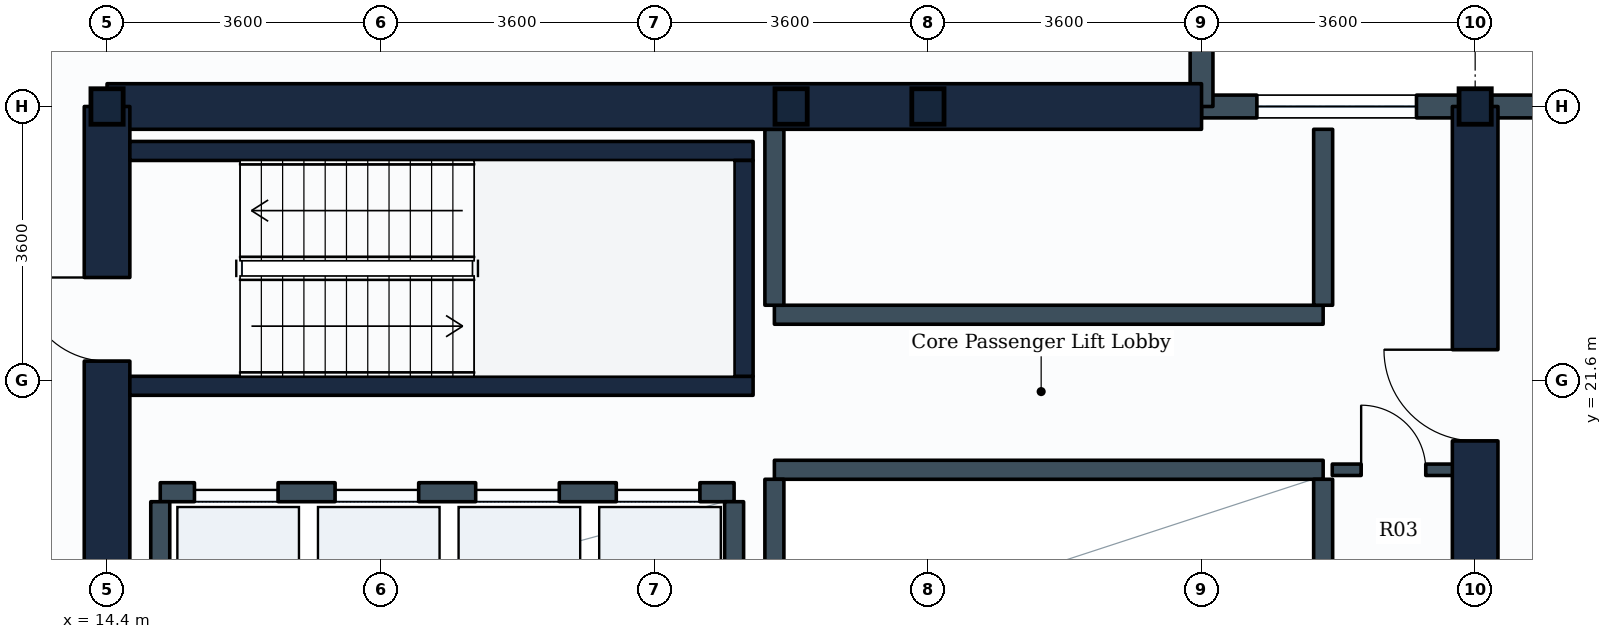
"""IFC4 building model, lengths in metres.
Left out: names, types, materials, properties, quantities, classifications, styles, units other than length and angle.
Written with IfcOpenShell. Run it as: python <this file> out.ifc"""

import sys

from ifc_helpers import new_model, si_unit, direction, frame, frame_2d, origin, origin_2d, place, context, subcontext, project, spatial, rectangle, i_section, extrude, element, fill, save


model = new_model("IFC4")
c1 = context("Model", 3, precision=1e-05, world=origin(), true_north=direction((0.0, 1.0)))
c2 = subcontext(c1, "Body", "Model", "MODEL_VIEW")
j1 = project(units=[si_unit("LENGTHUNIT", "METRE"), si_unit("PLANEANGLEUNIT", "RADIAN")], contexts=[c1])
p1 = place(None, origin())
s1 = spatial("IfcSite", under=j1, at=p1, CompositionType="ELEMENT")
p2 = place(p1, origin())
s2 = spatial("IfcBuilding", under=s1, at=p2, CompositionType="ELEMENT")
p3 = place(p2, frame((0.0, 0.0, 27.9)))
s3 = spatial("IfcBuildingStorey", under=s2, at=p3, CompositionType="ELEMENT", Elevation=27.9)
for number, where, z_axis, x_axis in (
    (1, (14.4, 25.2, 0.0), (0.0, 0.0, 1.0), (1.0, 0.0, 0.0)),
    (2, (23.4, 25.2, 0.0), (0.0, 0.0, 1.0), (1.0, 0.0, 0.0)),
    (3, (25.2, 25.2, 0.0), (0.0, 0.0, 1.0), (1.0, 0.0, 0.0)),
    (4, (32.4, 25.2, 0.0), (0.0, 0.0, 1.0), (1.0, 0.0, 0.0)),
):
    element("IfcColumn", number, at=place(p3, frame(where, z_axis=z_axis, x_axis=x_axis)), inside=s3, PredefinedType="COLUMN", context=c2, shape_type="SweptSolid", body=[
        extrude(i_section(OverallWidth=0.424, OverallDepth=0.467, WebThickness=0.033, FlangeThickness=0.053, FilletRadius=0.015, at=origin_2d()), origin(), (0.0, 0.0, 1.0), 3.9),
    ])
p4 = place(p3, frame((32.4, 25.2, 0.0), z_axis=(0.0, 0.0, 1.0), x_axis=(1.0, 0.0, 0.0)))
e5 = element("IfcWall", 5, at=p4, inside=s3, PredefinedType="STANDARD", context=c2, shape_type="SweptSolid", body=[
    extrude(rectangle(XDim=3.6, YDim=0.3, at=frame_2d((1.8, 0.0))), origin(), (0.0, 0.0, 1.0), 2.93),
])
p5 = place(p3, frame((28.8, 25.2, 0.0), z_axis=(0.0, 0.0, 1.0), x_axis=(1.0, 0.0, 0.0)))
e6 = element("IfcWall", 6, at=p5, inside=s3, PredefinedType="STANDARD", context=c2, shape_type="SweptSolid", body=[
    extrude(rectangle(XDim=3.6, YDim=0.3, at=frame_2d((1.8, 0.0))), origin(), (0.0, 0.0, 1.0), 3.635),
])
p6 = place(p5, frame((0.728, 0.0, 0.85)))
e7 = element("IfcOpeningElement", 7, at=p6, cuts=e6, PredefinedType="OPENING", context=c2, shape_type="SweptSolid", body=[
    extrude(rectangle(XDim=2.1, YDim=1.35, at=frame_2d((1.05, 0.675))), frame((0.0, 0.16, 0.0), z_axis=(0.0, -1.0, 0.0), x_axis=(1.0, 0.0, 0.0)), (0.0, 0.0, 1.0), 0.32),
])
p7 = place(p3, frame((28.8, 25.2, 0.0), z_axis=(0.0, 0.0, 1.0), x_axis=(0.0, 1.0, 0.0)))
e8 = element("IfcWall", 8, at=p7, inside=s3, PredefinedType="STANDARD", context=c2, shape_type="SweptSolid", body=[
    extrude(rectangle(XDim=3.6, YDim=0.3, at=frame_2d((1.8, 0.0))), origin(), (0.0, 0.0, 1.0), 3.14),
])
p8 = place(p3, frame((14.4, 25.2, 0.0), z_axis=(0.0, 0.0, 1.0), x_axis=(1.0, 0.0, 0.0)))
e9 = element("IfcWall", 9, at=p8, inside=s3, PredefinedType="SHEAR", context=c2, shape_type="SweptSolid", body=[
    extrude(rectangle(XDim=14.4, YDim=0.6, at=frame_2d((7.2, 0.0))), origin(), (0.0, 0.0, 1.0), 3.65),
])
p9 = place(p3, frame((14.4, 10.8, 0.0), z_axis=(0.0, 0.0, 1.0), x_axis=(0.0, 1.0, 0.0)))
e10 = element("IfcWall", 10, at=p9, inside=s3, PredefinedType="SHEAR", context=c2, shape_type="SweptSolid", body=[
    extrude(rectangle(XDim=14.4, YDim=0.6, at=frame_2d((7.2, 0.0))), origin(), (0.0, 0.0, 1.0), 3.65),
])
p10 = place(p9, frame((11.05, 0.0, 0.0)))
e11 = element("IfcOpeningElement", 11, at=p10, cuts=e10, PredefinedType="OPENING", context=c2, shape_type="SweptSolid", body=[
    extrude(rectangle(XDim=1.1, YDim=2.1, at=frame_2d((0.55, 1.05))), frame((0.0, 0.31, 0.0), z_axis=(0.0, -1.0, 0.0), x_axis=(1.0, 0.0, 0.0)), (0.0, 0.0, 1.0), 0.62),
])
p11 = place(p9, frame((4.9, 0.0, 0.0)))
e12 = element("IfcOpeningElement", 12, at=p11, cuts=e10, PredefinedType="OPENING", context=c2, shape_type="SweptSolid", body=[
    extrude(rectangle(XDim=1.2, YDim=2.1, at=frame_2d((0.6, 1.05))), frame((0.0, 0.31, 0.0), z_axis=(0.0, -1.0, 0.0), x_axis=(1.0, 0.0, 0.0)), (0.0, 0.0, 1.0), 0.62),
])
p12 = place(p3, frame((32.4, 10.8, 0.0), z_axis=(0.0, 0.0, 1.0), x_axis=(0.0, 1.0, 0.0)))
e13 = element("IfcWall", 13, at=p12, inside=s3, PredefinedType="SHEAR", context=c2, shape_type="SweptSolid", body=[
    extrude(rectangle(XDim=14.4, YDim=0.6, at=frame_2d((7.2, 0.0))), origin(), (0.0, 0.0, 1.0), 3.65),
])
p13 = place(p12, frame((4.35, 0.0, 0.0)))
e14 = element("IfcOpeningElement", 14, at=p13, cuts=e13, PredefinedType="OPENING", context=c2, shape_type="SweptSolid", body=[
    extrude(rectangle(XDim=1.2, YDim=2.1, at=frame_2d((0.6, 1.05))), frame((0.0, 0.31, 0.0), z_axis=(0.0, -1.0, 0.0), x_axis=(1.0, 0.0, 0.0)), (0.0, 0.0, 1.0), 0.62),
])
p14 = place(p12, frame((10.0, 0.0, 0.0)))
e15 = element("IfcOpeningElement", 15, at=p14, cuts=e13, PredefinedType="OPENING", context=c2, shape_type="SweptSolid", body=[
    extrude(rectangle(XDim=1.2, YDim=2.1, at=frame_2d((0.6, 1.05))), frame((0.0, 0.31, 0.0), z_axis=(0.0, -1.0, 0.0), x_axis=(1.0, 0.0, 0.0)), (0.0, 0.0, 1.0), 0.62),
])
for number, where, z_axis, x_axis in (
    (16, (14.7, 21.525, 0.0), (0.0, 0.0, 1.0), (1.0, 0.0, 0.0)),
    (17, (14.7, 24.615, 0.0), (0.0, 0.0, 1.0), (1.0, 0.0, 0.0)),
):
    element("IfcWall", number, at=place(p3, frame(where, z_axis=z_axis, x_axis=x_axis)), inside=s3, PredefinedType="SHEAR", context=c2, shape_type="SweptSolid", body=[
        extrude(rectangle(XDim=8.2, YDim=0.25, at=frame_2d((4.1, 0.0))), origin(), (0.0, 0.0, 1.0), 3.65),
    ])
p15 = place(p3, frame((22.775, 21.65, 0.0), z_axis=(0.0, 0.0, 1.0), x_axis=(0.0, 1.0, 0.0)))
e18 = element("IfcWall", 18, at=p15, inside=s3, PredefinedType="SHEAR", context=c2, shape_type="SweptSolid", body=[
    extrude(rectangle(XDim=2.84, YDim=0.25, at=frame_2d((1.42, 0.0))), origin(), (0.0, 0.0, 1.0), 3.65),
])
p16 = place(p3, frame((15.1, 20.125, 0.0), z_axis=(0.0, 0.0, 1.0), x_axis=(1.0, 0.0, 0.0)))
e19 = element("IfcWall", 19, at=p16, inside=s3, PredefinedType="PARTITIONING", context=c2, shape_type="SweptSolid", body=[
    extrude(rectangle(XDim=7.55, YDim=0.25, at=frame_2d((3.775, 0.0))), origin(), (0.0, 0.0, 1.0), 3.635),
])
p17 = place(p16, frame((0.45, 0.0, 0.0)))
e20 = element("IfcOpeningElement", 20, at=p17, cuts=e19, PredefinedType="OPENING", context=c2, shape_type="SweptSolid", body=[
    extrude(rectangle(XDim=1.1, YDim=2.1, at=frame_2d((0.55, 1.05))), frame((0.0, 0.135, 0.0), z_axis=(0.0, -1.0, 0.0), x_axis=(1.0, 0.0, 0.0)), (0.0, 0.0, 1.0), 0.27),
])
p18 = place(p16, frame((2.3, 0.0, 0.0)))
e21 = element("IfcOpeningElement", 21, at=p18, cuts=e19, PredefinedType="OPENING", context=c2, shape_type="SweptSolid", body=[
    extrude(rectangle(XDim=1.1, YDim=2.1, at=frame_2d((0.55, 1.05))), frame((0.0, 0.135, 0.0), z_axis=(0.0, -1.0, 0.0), x_axis=(1.0, 0.0, 0.0)), (0.0, 0.0, 1.0), 0.27),
])
p19 = place(p16, frame((4.15, 0.0, 0.0)))
e22 = element("IfcOpeningElement", 22, at=p19, cuts=e19, PredefinedType="OPENING", context=c2, shape_type="SweptSolid", body=[
    extrude(rectangle(XDim=1.1, YDim=2.1, at=frame_2d((0.55, 1.05))), frame((0.0, 0.135, 0.0), z_axis=(0.0, -1.0, 0.0), x_axis=(1.0, 0.0, 0.0)), (0.0, 0.0, 1.0), 0.27),
])
p20 = place(p16, frame((6.0, 0.0, 0.0)))
e23 = element("IfcOpeningElement", 23, at=p20, cuts=e19, PredefinedType="OPENING", context=c2, shape_type="SweptSolid", body=[
    extrude(rectangle(XDim=1.1, YDim=2.1, at=frame_2d((0.55, 1.05))), frame((0.0, 0.135, 0.0), z_axis=(0.0, -1.0, 0.0), x_axis=(1.0, 0.0, 0.0)), (0.0, 0.0, 1.0), 0.27),
])
for number, where, z_axis, x_axis in (
    (24, (15.1, 18.025, 0.0), (0.0, 0.0, 1.0), (0.0, 1.0, 0.0)),
    (25, (22.65, 18.025, 0.0), (0.0, 0.0, 1.0), (0.0, 1.0, 0.0)),
):
    element("IfcWall", number, at=place(p3, frame(where, z_axis=z_axis, x_axis=x_axis)), inside=s3, PredefinedType="PARTITIONING", context=c2, shape_type="SweptSolid", body=[
        extrude(rectangle(XDim=1.975, YDim=0.25, at=frame_2d((0.988, 0.0))), origin(), (0.0, 0.0, 1.0), 3.635),
    ])
p21 = place(p3, frame((23.18, 20.42, 0.0), z_axis=(0.0, 0.0, 1.0), x_axis=(1.0, 0.0, 0.0)))
e26 = element("IfcWall", 26, at=p21, inside=s3, PredefinedType="PARTITIONING", context=c2, shape_type="SweptSolid", body=[
    extrude(rectangle(XDim=7.22, YDim=0.25, at=frame_2d((3.61, 0.0))), origin(), (0.0, 0.0, 1.0), 3.635),
])
for number, where, z_axis, x_axis in (
    (27, (23.18, 18.025, 0.0), (0.0, 0.0, 1.0), (0.0, 1.0, 0.0)),
    (28, (30.4, 18.025, 0.0), (0.0, 0.0, 1.0), (0.0, 1.0, 0.0)),
):
    element("IfcWall", number, at=place(p3, frame(where, z_axis=z_axis, x_axis=x_axis)), inside=s3, PredefinedType="PARTITIONING", context=c2, shape_type="SweptSolid", body=[
        extrude(rectangle(XDim=2.27, YDim=0.25, at=frame_2d((1.135, 0.0))), origin(), (0.0, 0.0, 1.0), 3.635),
    ])
p22 = place(p3, frame((23.18, 22.46, 0.0), z_axis=(0.0, 0.0, 1.0), x_axis=(1.0, 0.0, 0.0)))
e29 = element("IfcWall", 29, at=p22, inside=s3, PredefinedType="PARTITIONING", context=c2, shape_type="SweptSolid", body=[
    extrude(rectangle(XDim=7.22, YDim=0.25, at=frame_2d((3.61, 0.0))), origin(), (0.0, 0.0, 1.0), 3.635),
])
for number, where, z_axis, x_axis in (
    (30, (23.18, 22.585, 0.0), (0.0, 0.0, 1.0), (0.0, 1.0, 0.0)),
    (31, (30.4, 22.585, 0.0), (0.0, 0.0, 1.0), (0.0, 1.0, 0.0)),
):
    element("IfcWall", number, at=place(p3, frame(where, z_axis=z_axis, x_axis=x_axis)), inside=s3, PredefinedType="PARTITIONING", context=c2, shape_type="SweptSolid", body=[
        extrude(rectangle(XDim=2.315, YDim=0.25, at=frame_2d((1.157, 0.0))), origin(), (0.0, 0.0, 1.0), 3.635),
    ])
p23 = place(p3, frame((30.52, 20.42, 0.0), z_axis=(0.0, 0.0, 1.0), x_axis=(1.0, 0.0, 0.0)))
e32 = element("IfcWall", 32, at=p23, inside=s3, PredefinedType="PARTITIONING", context=c2, shape_type="SweptSolid", body=[
    extrude(rectangle(XDim=1.63, YDim=0.15, at=frame_2d((0.815, 0.0))), origin(), (0.0, 0.0, 1.0), 3.635),
])
p24 = place(p23, frame((0.38, 0.0, 0.0)))
e33 = element("IfcOpeningElement", 33, at=p24, cuts=e32, PredefinedType="OPENING", context=c2, shape_type="SweptSolid", body=[
    extrude(rectangle(XDim=0.85, YDim=2.1, at=frame_2d((0.425, 1.05))), frame((0.0, 0.085, 0.0), z_axis=(0.0, -1.0, 0.0), x_axis=(1.0, 0.0, 0.0)), (0.0, 0.0, 1.0), 0.17),
])
p25 = place(p6, origin())
e34 = element("IfcWindow", 34, at=p25, inside=s3, PartitioningType="SINGLE_PANEL", PredefinedType="WINDOW", context=c2, shape_type="SweptSolid", body=[
    extrude(rectangle(XDim=2.1, YDim=1.35, at=frame_2d((1.05, 0.675))), frame((0.0, 0.03, 0.0), z_axis=(0.0, -1.0, 0.0), x_axis=(1.0, 0.0, 0.0)), (0.0, 0.0, 1.0), 0.06),
])
fill(e7, e34)
p26 = place(p10, origin())
e35 = element("IfcDoor", 35, at=p26, inside=s3, OperationType="SINGLE_SWING_RIGHT", PredefinedType="DOOR", context=c2, shape_type="SweptSolid", body=[
    extrude(rectangle(XDim=1.1, YDim=2.1, at=frame_2d((0.55, 1.05))), frame((0.0, 0.025, 0.0), z_axis=(0.0, -1.0, 0.0), x_axis=(1.0, 0.0, 0.0)), (0.0, 0.0, 1.0), 0.05),
])
fill(e11, e35)
p27 = place(p17, origin())
e36 = element("IfcDoor", 36, at=p27, inside=s3, OperationType="SLIDING_TO_LEFT", PredefinedType="DOOR", context=c2, shape_type="SweptSolid", body=[
    extrude(rectangle(XDim=1.1, YDim=2.1, at=frame_2d((0.55, 1.05))), frame((0.0, 0.025, 0.0), z_axis=(0.0, -1.0, 0.0), x_axis=(1.0, 0.0, 0.0)), (0.0, 0.0, 1.0), 0.05),
])
fill(e20, e36)
p28 = place(p18, origin())
e37 = element("IfcDoor", 37, at=p28, inside=s3, OperationType="SLIDING_TO_LEFT", PredefinedType="DOOR", context=c2, shape_type="SweptSolid", body=[
    extrude(rectangle(XDim=1.1, YDim=2.1, at=frame_2d((0.55, 1.05))), frame((0.0, 0.025, 0.0), z_axis=(0.0, -1.0, 0.0), x_axis=(1.0, 0.0, 0.0)), (0.0, 0.0, 1.0), 0.05),
])
fill(e21, e37)
p29 = place(p19, origin())
e38 = element("IfcDoor", 38, at=p29, inside=s3, OperationType="SLIDING_TO_LEFT", PredefinedType="DOOR", context=c2, shape_type="SweptSolid", body=[
    extrude(rectangle(XDim=1.1, YDim=2.1, at=frame_2d((0.55, 1.05))), frame((0.0, 0.025, 0.0), z_axis=(0.0, -1.0, 0.0), x_axis=(1.0, 0.0, 0.0)), (0.0, 0.0, 1.0), 0.05),
])
fill(e22, e38)
p30 = place(p20, origin())
e39 = element("IfcDoor", 39, at=p30, inside=s3, OperationType="SLIDING_TO_LEFT", PredefinedType="DOOR", context=c2, shape_type="SweptSolid", body=[
    extrude(rectangle(XDim=1.1, YDim=2.1, at=frame_2d((0.55, 1.05))), frame((0.0, 0.025, 0.0), z_axis=(0.0, -1.0, 0.0), x_axis=(1.0, 0.0, 0.0)), (0.0, 0.0, 1.0), 0.05),
])
fill(e23, e39)
p31 = place(p14, origin())
e40 = element("IfcDoor", 40, at=p31, inside=s3, OperationType="SINGLE_SWING_RIGHT", PredefinedType="DOOR", context=c2, shape_type="SweptSolid", body=[
    extrude(rectangle(XDim=1.2, YDim=2.1, at=frame_2d((0.6, 1.05))), frame((0.0, 0.025, 0.0), z_axis=(0.0, -1.0, 0.0), x_axis=(1.0, 0.0, 0.0)), (0.0, 0.0, 1.0), 0.05),
])
fill(e15, e40)
p32 = place(p24, origin())
e41 = element("IfcDoor", 41, at=p32, inside=s3, OperationType="SINGLE_SWING_LEFT", PredefinedType="DOOR", context=c2, shape_type="SweptSolid", body=[
    extrude(rectangle(XDim=0.85, YDim=2.1, at=frame_2d((0.425, 1.05))), frame((0.0, 0.025, 0.0), z_axis=(0.0, -1.0, 0.0), x_axis=(1.0, 0.0, 0.0)), (0.0, 0.0, 1.0), 0.05),
])
fill(e33, e41)
save(model, sys.argv[1])
